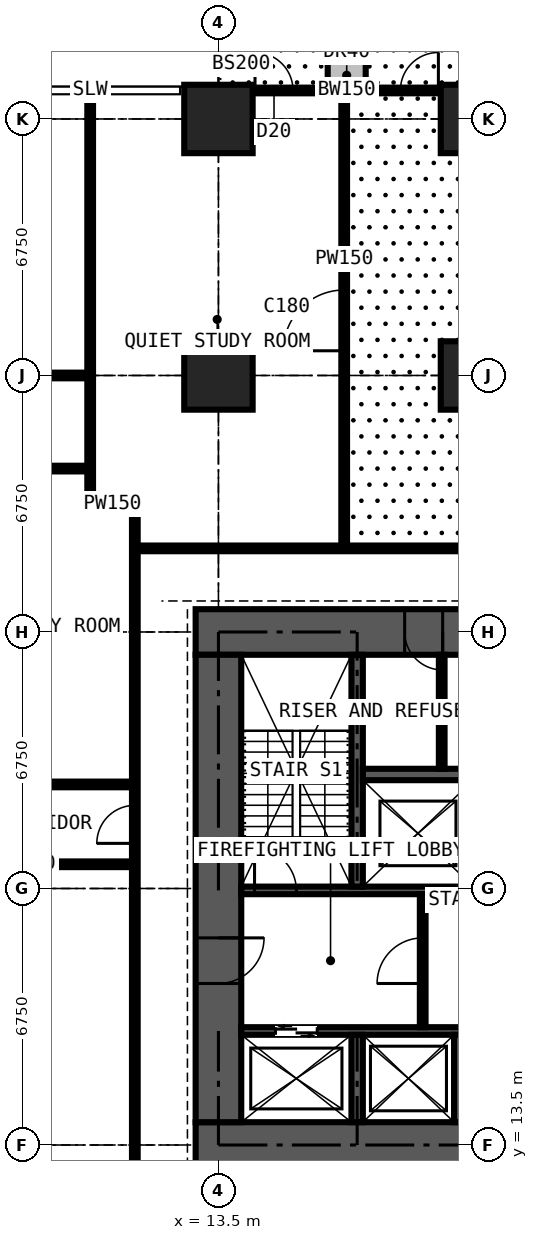
"""IFC4 building model, lengths in metres.
Left out: names, types, materials, properties, quantities, classifications, styles, units other than length and angle.
Written with IfcOpenShell. Run it as: python <this file> out.ifc"""

import sys

from ifc_helpers import new_model, si_unit, direction, frame, frame_2d, origin, origin_2d, place, context, subcontext, project, spatial, rectangle, extrude, element, fill, save


model = new_model("IFC4")
c1 = context("Model", 3, precision=1e-05, world=origin(), true_north=direction((0.0, 1.0)))
c2 = subcontext(c1, "Body", "Model", "MODEL_VIEW")
j1 = project(units=[si_unit("LENGTHUNIT", "METRE"), si_unit("PLANEANGLEUNIT", "RADIAN")], contexts=[c1])
p1 = place(None, origin())
s1 = spatial("IfcSite", under=j1, at=p1, CompositionType="ELEMENT")
p2 = place(p1, origin())
s2 = spatial("IfcBuilding", under=s1, at=p2, CompositionType="ELEMENT")
p3 = place(p2, frame((0.0, 0.0, 46.8)))
s3 = spatial("IfcBuildingStorey", under=s2, at=p3, CompositionType="ELEMENT", Elevation=46.8)
for number, where, z_axis, x_axis in (
    (1, (13.5, 33.75, 0.0), (0.0, 0.0, 1.0), (1.0, 0.0, 0.0)),
    (2, (13.5, 40.5, 0.0), (0.0, 0.0, 1.0), (1.0, 0.0, 0.0)),
    (3, (20.25, 33.75, 0.0), (0.0, 0.0, 1.0), (1.0, 0.0, 0.0)),
    (4, (20.25, 40.5, 0.0), (0.0, 0.0, 1.0), (1.0, 0.0, 0.0)),
):
    element("IfcColumn", number, at=place(p3, frame(where, z_axis=z_axis, x_axis=x_axis)), inside=s3, PredefinedType="COLUMN", context=c2, shape_type="SweptSolid", body=[
        extrude(rectangle(XDim=1.8, YDim=1.8, at=origin_2d()), origin(), (0.0, 0.0, 1.0), 3.6),
    ])
p4 = place(p3, frame((12.9, 13.5, 0.0), z_axis=(0.0, 0.0, 1.0), x_axis=(1.0, 0.0, 0.0)))
e5 = element("IfcWall", 5, at=p4, inside=s3, PredefinedType="SHEAR", context=c2, shape_type="SweptSolid", body=[
    extrude(rectangle(XDim=14.7, YDim=1.2, at=frame_2d((7.35, 0.0))), origin(), (0.0, 0.0, 1.0), 3.6),
])
p5 = place(p3, frame((27.6, 27.0, 0.0), z_axis=(0.0, 0.0, 1.0), x_axis=(-1.0, 0.0, 0.0)))
e6 = element("IfcWall", 6, at=p5, inside=s3, PredefinedType="SHEAR", context=c2, shape_type="SweptSolid", body=[
    extrude(rectangle(XDim=14.7, YDim=1.2, at=frame_2d((7.35, 0.0))), origin(), (0.0, 0.0, 1.0), 3.6),
])
p6 = place(p5, frame((5.225, 0.0, 0.0)))
e7 = element("IfcOpeningElement", 7, at=p6, cuts=e6, PredefinedType="OPENING", context=c2, shape_type="SweptSolid", body=[
    extrude(rectangle(XDim=0.9, YDim=2.2, at=frame_2d((0.45, 1.1))), frame((0.0, 0.61, 0.0), z_axis=(0.0, -1.0, 0.0), x_axis=(1.0, 0.0, 0.0)), (0.0, 0.0, 1.0), 1.22),
])
p7 = place(p5, frame((8.2, 0.0, 0.0)))
e8 = element("IfcOpeningElement", 8, at=p7, cuts=e6, PredefinedType="OPENING", context=c2, shape_type="SweptSolid", body=[
    extrude(rectangle(XDim=1.0, YDim=2.2, at=frame_2d((0.5, 1.1))), frame((0.0, 0.61, 0.0), z_axis=(0.0, -1.0, 0.0), x_axis=(1.0, 0.0, 0.0)), (0.0, 0.0, 1.0), 1.22),
])
p8 = place(p3, frame((13.5, 26.4, 0.0), z_axis=(0.0, 0.0, 1.0), x_axis=(0.0, -1.0, 0.0)))
e9 = element("IfcWall", 9, at=p8, inside=s3, PredefinedType="SHEAR", context=c2, shape_type="SweptSolid", body=[
    extrude(rectangle(XDim=12.3, YDim=1.2, at=frame_2d((6.15, 0.0))), origin(), (0.0, 0.0, 1.0), 3.6),
])
p9 = place(p8, frame((7.45, 0.0, 0.0)))
e10 = element("IfcOpeningElement", 10, at=p9, cuts=e9, PredefinedType="OPENING", context=c2, shape_type="SweptSolid", body=[
    extrude(rectangle(XDim=1.2, YDim=2.2, at=frame_2d((0.6, 1.1))), frame((0.0, 0.61, 0.0), z_axis=(0.0, -1.0, 0.0), x_axis=(1.0, 0.0, 0.0)), (0.0, 0.0, 1.0), 1.22),
])
p10 = place(p3, frame((13.5, 41.25, 0.0), z_axis=(0.0, 0.0, 1.0), x_axis=(1.0, 0.0, 0.0)))
e11 = element("IfcWall", 11, at=p10, inside=s3, PredefinedType="SOLIDWALL", context=c2, shape_type="SweptSolid", body=[
    extrude(rectangle(XDim=6.75, YDim=0.15, at=frame_2d((3.375, 0.0))), origin(), (0.0, 0.0, 1.0), 3.375),
])
p11 = place(p10, frame((0.962, 0.0, 0.0)))
e12 = element("IfcOpeningElement", 12, at=p11, cuts=e11, PredefinedType="OPENING", context=c2, shape_type="SweptSolid", body=[
    extrude(rectangle(XDim=1.0, YDim=2.2, at=frame_2d((0.5, 1.1))), frame((0.0, 0.085, 0.0), z_axis=(0.0, -1.0, 0.0), x_axis=(1.0, 0.0, 0.0)), (0.0, 0.0, 1.0), 0.17),
])
p12 = place(p10, frame((2.025, 0.0, 0.9)))
e13 = element("IfcOpeningElement", 13, at=p12, cuts=e11, PredefinedType="OPENING", context=c2, shape_type="SweptSolid", body=[
    extrude(rectangle(XDim=1.2, YDim=1.8, at=frame_2d((0.6, 0.9))), frame((0.0, 0.085, 0.0), z_axis=(0.0, -1.0, 0.0), x_axis=(1.0, 0.0, 0.0)), (0.0, 0.0, 1.0), 0.17),
])
p13 = place(p10, frame((4.788, 0.0, 0.0)))
e14 = element("IfcOpeningElement", 14, at=p13, cuts=e11, PredefinedType="OPENING", context=c2, shape_type="SweptSolid", body=[
    extrude(rectangle(XDim=1.0, YDim=2.2, at=frame_2d((0.5, 1.1))), frame((0.0, 0.085, 0.0), z_axis=(0.0, -1.0, 0.0), x_axis=(1.0, 0.0, 0.0)), (0.0, 0.0, 1.0), 0.17),
])
p14 = place(p10, frame((3.525, 0.0, 0.9)))
e15 = element("IfcOpeningElement", 15, at=p14, cuts=e11, PredefinedType="OPENING", context=c2, shape_type="SweptSolid", body=[
    extrude(rectangle(XDim=1.2, YDim=1.8, at=frame_2d((0.6, 0.9))), frame((0.0, 0.085, 0.0), z_axis=(0.0, -1.0, 0.0), x_axis=(1.0, 0.0, 0.0)), (0.0, 0.0, 1.0), 0.17),
])
p15 = place(p3, frame((16.875, 41.35, 0.0), z_axis=(0.0, 0.0, 1.0), x_axis=(0.0, 1.0, 0.0)))
e16 = element("IfcWall", 16, at=p15, inside=s3, PredefinedType="USERDEFINED", context=c2, shape_type="SweptSolid", body=[
    extrude(rectangle(XDim=2.2, YDim=1.0, at=frame_2d((1.1, 0.0))), origin(), (0.0, 0.0, 1.0), 0.9),
])
p16 = place(p3, frame((14.1, 16.5, 0.0), z_axis=(0.0, 0.0, 1.0), x_axis=(1.0, 0.0, 0.0)))
e17 = element("IfcWall", 17, at=p16, inside=s3, PredefinedType="SHEAR", context=c2, shape_type="SweptSolid", body=[
    extrude(rectangle(XDim=12.3, YDim=0.2, at=frame_2d((6.15, 0.0))), origin(), (0.0, 0.0, 1.0), 3.6),
])
p17 = place(p16, frame((0.9, 0.0, 0.0)))
e18 = element("IfcOpeningElement", 18, at=p17, cuts=e17, PredefinedType="OPENING", context=c2, shape_type="SweptSolid", body=[
    extrude(rectangle(XDim=1.1, YDim=2.2, at=frame_2d((0.55, 1.1))), frame((0.0, 0.11, 0.0), z_axis=(0.0, -1.0, 0.0), x_axis=(1.0, 0.0, 0.0)), (0.0, 0.0, 1.0), 0.22),
])
p18 = place(p16, frame((9.5, 0.0, 0.0)))
e19 = element("IfcOpeningElement", 19, at=p18, cuts=e17, PredefinedType="OPENING", context=c2, shape_type="SweptSolid", body=[
    extrude(rectangle(XDim=1.1, YDim=2.2, at=frame_2d((0.55, 1.1))), frame((0.0, 0.11, 0.0), z_axis=(0.0, -1.0, 0.0), x_axis=(1.0, 0.0, 0.0)), (0.0, 0.0, 1.0), 0.22),
])
p19 = place(p3, frame((14.1, 20.2, 0.0), z_axis=(0.0, 0.0, 1.0), x_axis=(1.0, 0.0, 0.0)))
e20 = element("IfcWall", 20, at=p19, inside=s3, PredefinedType="SHEAR", context=c2, shape_type="SweptSolid", body=[
    extrude(rectangle(XDim=12.3, YDim=0.2, at=frame_2d((6.15, 0.0))), origin(), (0.0, 0.0, 1.0), 3.6),
])
p20 = place(p19, frame((0.35, 0.0, 0.0)))
e21 = element("IfcOpeningElement", 21, at=p20, cuts=e20, PredefinedType="OPENING", context=c2, shape_type="SweptSolid", body=[
    extrude(rectangle(XDim=1.1, YDim=2.2, at=frame_2d((0.55, 1.1))), frame((0.0, 0.11, 0.0), z_axis=(0.0, -1.0, 0.0), x_axis=(1.0, 0.0, 0.0)), (0.0, 0.0, 1.0), 0.22),
])
p21 = place(p19, frame((9.75, 0.0, 0.0)))
e22 = element("IfcOpeningElement", 22, at=p21, cuts=e20, PredefinedType="OPENING", context=c2, shape_type="SweptSolid", body=[
    extrude(rectangle(XDim=1.1, YDim=2.2, at=frame_2d((0.55, 1.1))), frame((0.0, 0.11, 0.0), z_axis=(0.0, -1.0, 0.0), x_axis=(1.0, 0.0, 0.0)), (0.0, 0.0, 1.0), 0.22),
])
p22 = place(p3, frame((17.15, 20.3, 0.0), z_axis=(0.0, 0.0, 1.0), x_axis=(0.0, 1.0, 0.0)))
e23 = element("IfcWall", 23, at=p22, inside=s3, PredefinedType="SHEAR", context=c2, shape_type="SweptSolid", body=[
    extrude(rectangle(XDim=6.1, YDim=0.3, at=frame_2d((3.05, 0.0))), origin(), (0.0, 0.0, 1.0), 3.6),
])
p23 = place(p3, frame((17.3, 23.25, 0.0), z_axis=(0.0, 0.0, 1.0), x_axis=(1.0, 0.0, 0.0)))
e24 = element("IfcWall", 24, at=p23, inside=s3, PredefinedType="SHEAR", context=c2, shape_type="SweptSolid", body=[
    extrude(rectangle(XDim=5.9, YDim=0.3, at=frame_2d((2.95, 0.0))), origin(), (0.0, 0.0, 1.0), 3.6),
])
for number, where, z_axis, x_axis in (
    (25, (17.15, 14.1, 0.0), (0.0, 0.0, 1.0), (0.0, 1.0, 0.0)),
    (26, (19.85, 14.1, 0.0), (0.0, 0.0, 1.0), (0.0, 1.0, 0.0)),
):
    element("IfcWall", number, at=place(p3, frame(where, z_axis=z_axis, x_axis=x_axis)), inside=s3, PredefinedType="SHEAR", context=c2, shape_type="SweptSolid", body=[
        extrude(rectangle(XDim=2.3, YDim=0.3, at=frame_2d((1.15, 0.0))), origin(), (0.0, 0.0, 1.0), 3.6),
    ])
p24 = place(p3, frame((18.875, 16.6, 0.0), z_axis=(0.0, 0.0, 1.0), x_axis=(0.0, 1.0, 0.0)))
e27 = element("IfcWall", 27, at=p24, inside=s3, PredefinedType="PARTITIONING", context=c2, shape_type="SweptSolid", body=[
    extrude(rectangle(XDim=3.5, YDim=0.15, at=frame_2d((1.75, 0.0))), origin(), (0.0, 0.0, 1.0), 3.375),
])
p25 = place(p24, frame((1.15, 0.0, 0.0)))
e28 = element("IfcOpeningElement", 28, at=p25, cuts=e27, PredefinedType="OPENING", context=c2, shape_type="SweptSolid", body=[
    extrude(rectangle(XDim=1.2, YDim=2.2, at=frame_2d((0.6, 1.1))), frame((0.0, 0.085, 0.0), z_axis=(0.0, -1.0, 0.0), x_axis=(1.0, 0.0, 0.0)), (0.0, 0.0, 1.0), 0.17),
])
p26 = place(p3, frame((19.375, 23.4, 0.0), z_axis=(0.0, 0.0, 1.0), x_axis=(0.0, 1.0, 0.0)))
e29 = element("IfcWall", 29, at=p26, inside=s3, PredefinedType="PARTITIONING", context=c2, shape_type="SweptSolid", body=[
    extrude(rectangle(XDim=3.0, YDim=0.15, at=frame_2d((1.5, 0.0))), origin(), (0.0, 0.0, 1.0), 3.375),
])
p27 = place(p3, frame((-0.734, 33.75, 0.0), z_axis=(0.0, 0.0, 1.0), x_axis=(1.0, 0.0, 0.0)))
e30 = element("IfcWall", 30, at=p27, inside=s3, PredefinedType="PARTITIONING", context=c2, shape_type="SweptSolid", body=[
    extrude(rectangle(XDim=10.859, YDim=0.15, at=frame_2d((5.429, 0.0))), origin(), (0.0, 0.0, 1.0), 2.877),
])
p28 = place(p27, frame((8.434, 0.0, 0.0)))
e31 = element("IfcOpeningElement", 31, at=p28, cuts=e30, PredefinedType="OPENING", context=c2, shape_type="SweptSolid", body=[
    extrude(rectangle(XDim=1.0, YDim=2.2, at=frame_2d((0.5, 1.1))), frame((0.0, 0.085, 0.0), z_axis=(0.0, -1.0, 0.0), x_axis=(1.0, 0.0, 0.0)), (0.0, 0.0, 1.0), 0.17),
])
for number, where, z_axis, x_axis in (
    (32, (5.65, 20.887, 0.0), (0.0, 0.0, 1.0), (1.0, 0.0, 0.0)),
    (33, (5.65, 22.988, 0.0), (0.0, 0.0, 1.0), (1.0, 0.0, 0.0)),
):
    element("IfcWall", number, at=place(p3, frame(where, z_axis=z_axis, x_axis=x_axis)), inside=s3, PredefinedType="PARTITIONING", context=c2, shape_type="SweptSolid", body=[
        extrude(rectangle(XDim=5.65, YDim=0.15, at=frame_2d((2.825, 0.0))), origin(), (0.0, 0.0, 1.0), 3.375),
    ])
p29 = place(p3, frame((5.65, 31.3, 0.0), z_axis=(0.0, 0.0, 1.0), x_axis=(1.0, 0.0, 0.0)))
e34 = element("IfcWall", 34, at=p29, inside=s3, PredefinedType="PARTITIONING", context=c2, shape_type="SweptSolid", body=[
    extrude(rectangle(XDim=4.475, YDim=0.15, at=frame_2d((2.238, 0.0))), origin(), (0.0, 0.0, 1.0), 3.375),
])
p30 = place(p3, frame((10.125, 30.375, 0.0), z_axis=(0.0, 0.0, 1.0), x_axis=(0.0, 1.0, 0.0)))
e35 = element("IfcWall", 35, at=p30, inside=s3, PredefinedType="PARTITIONING", context=c2, shape_type="SweptSolid", body=[
    extrude(rectangle(XDim=10.859, YDim=0.15, at=frame_2d((5.429, 0.0))), origin(), (0.0, 0.0, 1.0), 3.375),
])
p31 = place(p3, frame((10.125, 30.375, 0.0), z_axis=(0.0, 0.0, 1.0), x_axis=(1.0, 0.0, 0.0)))
e36 = element("IfcWall", 36, at=p31, inside=s3, PredefinedType="PARTITIONING", context=c2, shape_type="SweptSolid", body=[
    extrude(rectangle(XDim=1.175, YDim=0.15, at=frame_2d((0.587, 0.0))), origin(), (0.0, 0.0, 1.0), 3.375),
])
p32 = place(p3, frame((11.3, 11.3, 0.0), z_axis=(0.0, 0.0, 1.0), x_axis=(0.0, 1.0, 0.0)))
e37 = element("IfcWall", 37, at=p32, inside=s3, PredefinedType="PARTITIONING", context=c2, shape_type="SweptSolid", body=[
    extrude(rectangle(XDim=19.075, YDim=0.15, at=frame_2d((9.538, 0.0))), origin(), (0.0, 0.0, 1.0), 3.375),
])
p33 = place(p32, frame((10.137, 0.0, 0.0)))
e38 = element("IfcOpeningElement", 38, at=p33, cuts=e37, PredefinedType="OPENING", context=c2, shape_type="SweptSolid", body=[
    extrude(rectangle(XDim=1.0, YDim=2.2, at=frame_2d((0.5, 1.1))), frame((0.0, 0.085, 0.0), z_axis=(0.0, -1.0, 0.0), x_axis=(1.0, 0.0, 0.0)), (0.0, 0.0, 1.0), 0.17),
])
p34 = place(p3, frame((11.3, 29.2, 0.0), z_axis=(0.0, 0.0, 1.0), x_axis=(1.0, 0.0, 0.0)))
e39 = element("IfcWall", 39, at=p34, inside=s3, PredefinedType="PARTITIONING", context=c2, shape_type="SweptSolid", body=[
    extrude(rectangle(XDim=19.075, YDim=0.15, at=frame_2d((9.538, 0.0))), origin(), (0.0, 0.0, 1.0), 3.375),
])
p35 = place(p34, frame((14.25, 0.0, 0.0)))
e40 = element("IfcOpeningElement", 40, at=p35, cuts=e39, PredefinedType="OPENING", context=c2, shape_type="SweptSolid", body=[
    extrude(rectangle(XDim=1.0, YDim=2.2, at=frame_2d((0.5, 1.1))), frame((0.0, 0.085, 0.0), z_axis=(0.0, -1.0, 0.0), x_axis=(1.0, 0.0, 0.0)), (0.0, 0.0, 1.0), 0.17),
])
p36 = place(p34, frame((16.35, 0.0, 0.0)))
e41 = element("IfcOpeningElement", 41, at=p36, cuts=e39, PredefinedType="OPENING", context=c2, shape_type="SweptSolid", body=[
    extrude(rectangle(XDim=1.0, YDim=2.2, at=frame_2d((0.5, 1.1))), frame((0.0, 0.085, 0.0), z_axis=(0.0, -1.0, 0.0), x_axis=(1.0, 0.0, 0.0)), (0.0, 0.0, 1.0), 0.17),
])
p37 = place(p34, frame((8.859, 0.0, 0.0)))
e42 = element("IfcOpeningElement", 42, at=p37, cuts=e39, PredefinedType="OPENING", context=c2, shape_type="SweptSolid", body=[
    extrude(rectangle(XDim=1.5, YDim=2.2, at=frame_2d((0.75, 1.1))), frame((0.0, 0.085, 0.0), z_axis=(0.0, -1.0, 0.0), x_axis=(1.0, 0.0, 0.0)), (0.0, 0.0, 1.0), 0.17),
])
p38 = place(p3, frame((16.809, 29.2, 0.0), z_axis=(0.0, 0.0, 1.0), x_axis=(0.0, 1.0, 0.0)))
e43 = element("IfcWall", 43, at=p38, inside=s3, PredefinedType="PARTITIONING", context=c2, shape_type="SweptSolid", body=[
    extrude(rectangle(XDim=12.034, YDim=0.15, at=frame_2d((6.017, 0.0))), origin(), (0.0, 0.0, 1.0), 3.375),
])
p39 = place(p38, frame((5.2, 0.0, 0.0)))
e44 = element("IfcOpeningElement", 44, at=p39, cuts=e43, PredefinedType="OPENING", context=c2, shape_type="SweptSolid", body=[
    extrude(rectangle(XDim=1.6, YDim=2.4, at=frame_2d((0.8, 1.2))), frame((0.0, 0.085, 0.0), z_axis=(0.0, -1.0, 0.0), x_axis=(1.0, 0.0, 0.0)), (0.0, 0.0, 1.0), 0.17),
])
p40 = place(p11, origin())
e45 = element("IfcDoor", 45, at=p40, inside=s3, OperationType="SINGLE_SWING_LEFT", PredefinedType="DOOR", context=c2, shape_type="SweptSolid", body=[
    extrude(rectangle(XDim=1.0, YDim=2.2, at=frame_2d((0.5, 1.1))), frame((0.0, 0.025, 0.0), z_axis=(0.0, -1.0, 0.0), x_axis=(1.0, 0.0, 0.0)), (0.0, 0.0, 1.0), 0.05),
])
fill(e12, e45)
p41 = place(p12, origin())
e46 = element("IfcWindow", 46, at=p41, inside=s3, PartitioningType="SINGLE_PANEL", PredefinedType="WINDOW", context=c2, shape_type="SweptSolid", body=[
    extrude(rectangle(XDim=1.2, YDim=1.8, at=frame_2d((0.6, 0.9))), frame((0.0, 0.03, 0.0), z_axis=(0.0, -1.0, 0.0), x_axis=(1.0, 0.0, 0.0)), (0.0, 0.0, 1.0), 0.06),
])
fill(e13, e46)
p42 = place(p13, origin())
e47 = element("IfcDoor", 47, at=p42, inside=s3, OperationType="SINGLE_SWING_RIGHT", PredefinedType="DOOR", context=c2, shape_type="SweptSolid", body=[
    extrude(rectangle(XDim=1.0, YDim=2.2, at=frame_2d((0.5, 1.1))), frame((0.0, 0.025, 0.0), z_axis=(0.0, -1.0, 0.0), x_axis=(1.0, 0.0, 0.0)), (0.0, 0.0, 1.0), 0.05),
])
fill(e14, e47)
p43 = place(p14, origin())
e48 = element("IfcWindow", 48, at=p43, inside=s3, PartitioningType="SINGLE_PANEL", PredefinedType="WINDOW", context=c2, shape_type="SweptSolid", body=[
    extrude(rectangle(XDim=1.2, YDim=1.8, at=frame_2d((0.6, 0.9))), frame((0.0, 0.03, 0.0), z_axis=(0.0, -1.0, 0.0), x_axis=(1.0, 0.0, 0.0)), (0.0, 0.0, 1.0), 0.06),
])
fill(e15, e48)
p44 = place(p17, origin())
e49 = element("IfcDoor", 49, at=p44, inside=s3, OperationType="DOUBLE_DOOR_SLIDING", PredefinedType="DOOR", context=c2, shape_type="SweptSolid", body=[
    extrude(rectangle(XDim=1.1, YDim=2.2, at=frame_2d((0.55, 1.1))), frame((0.0, 0.025, 0.0), z_axis=(0.0, -1.0, 0.0), x_axis=(1.0, 0.0, 0.0)), (0.0, 0.0, 1.0), 0.05),
])
fill(e18, e49)
p45 = place(p9, origin())
e50 = element("IfcDoor", 50, at=p45, inside=s3, OperationType="DOUBLE_DOOR_SINGLE_SWING", PredefinedType="DOOR", context=c2, shape_type="SweptSolid", body=[
    extrude(rectangle(XDim=1.2, YDim=2.2, at=frame_2d((0.6, 1.1))), frame((0.0, 0.025, 0.0), z_axis=(0.0, -1.0, 0.0), x_axis=(1.0, 0.0, 0.0)), (0.0, 0.0, 1.0), 0.05),
])
fill(e10, e50)
p46 = place(p25, origin())
e51 = element("IfcDoor", 51, at=p46, inside=s3, OperationType="DOUBLE_DOOR_SINGLE_SWING", PredefinedType="DOOR", context=c2, shape_type="SweptSolid", body=[
    extrude(rectangle(XDim=1.2, YDim=2.2, at=frame_2d((0.6, 1.1))), frame((0.0, 0.025, 0.0), z_axis=(0.0, -1.0, 0.0), x_axis=(1.0, 0.0, 0.0)), (0.0, 0.0, 1.0), 0.05),
])
fill(e28, e51)
p47 = place(p7, origin())
e52 = element("IfcDoor", 52, at=p47, inside=s3, OperationType="SINGLE_SWING_LEFT", PredefinedType="DOOR", context=c2, shape_type="SweptSolid", body=[
    extrude(rectangle(XDim=1.0, YDim=2.2, at=frame_2d((0.5, 1.1))), frame((0.0, 0.025, 0.0), z_axis=(0.0, -1.0, 0.0), x_axis=(1.0, 0.0, 0.0)), (0.0, 0.0, 1.0), 0.05),
])
fill(e8, e52)
p48 = place(p20, origin())
e53 = element("IfcDoor", 53, at=p48, inside=s3, OperationType="SINGLE_SWING_LEFT", PredefinedType="DOOR", context=c2, shape_type="SweptSolid", body=[
    extrude(rectangle(XDim=1.1, YDim=2.2, at=frame_2d((0.55, 1.1))), frame((0.0, 0.025, 0.0), z_axis=(0.0, -1.0, 0.0), x_axis=(1.0, 0.0, 0.0)), (0.0, 0.0, 1.0), 0.05),
])
fill(e21, e53)
p49 = place(p39, origin())
e54 = element("IfcDoor", 54, at=p49, inside=s3, OperationType="DOUBLE_DOOR_SINGLE_SWING", PredefinedType="DOOR", context=c2, shape_type="SweptSolid", body=[
    extrude(rectangle(XDim=1.6, YDim=2.4, at=frame_2d((0.8, 1.2))), frame((0.0, 0.025, 0.0), z_axis=(0.0, -1.0, 0.0), x_axis=(1.0, 0.0, 0.0)), (0.0, 0.0, 1.0), 0.05),
])
fill(e44, e54)
p50 = place(p33, origin())
e55 = element("IfcDoor", 55, at=p50, inside=s3, OperationType="SINGLE_SWING_LEFT", PredefinedType="DOOR", context=c2, shape_type="SweptSolid", body=[
    extrude(rectangle(XDim=1.0, YDim=2.2, at=frame_2d((0.5, 1.1))), frame((0.0, 0.025, 0.0), z_axis=(0.0, -1.0, 0.0), x_axis=(1.0, 0.0, 0.0)), (0.0, 0.0, 1.0), 0.05),
])
fill(e38, e55)
save(model, sys.argv[1])
